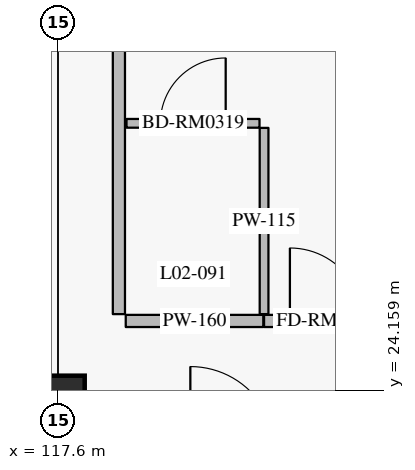
"""IFC4 building model, lengths in metres.
Left out: names, types, materials, properties, quantities, classifications, styles, units other than length and angle.
Written with IfcOpenShell. Run it as: python <this file> out.ifc"""

import sys

from ifc_helpers import new_model, si_unit, direction, frame, frame_2d, origin, origin_2d, place, context, subcontext, project, spatial, rectangle, extrude, element, fill, save


model = new_model("IFC4")
c1 = context("Model", 3, precision=1e-05, world=origin(), true_north=direction((0.0, 1.0)))
c2 = subcontext(c1, "Body", "Model", "MODEL_VIEW")
j1 = project(units=[si_unit("LENGTHUNIT", "METRE"), si_unit("PLANEANGLEUNIT", "RADIAN")], contexts=[c1])
p1 = place(None, origin())
s1 = spatial("IfcSite", under=j1, at=p1, CompositionType="ELEMENT")
p2 = place(p1, origin())
s2 = spatial("IfcBuilding", under=s1, at=p2, CompositionType="ELEMENT")
p3 = place(p2, frame((0.0, 0.0, 11.4)))
s3 = spatial("IfcBuildingStorey", under=s2, at=p3, CompositionType="ELEMENT", Elevation=11.4)
p4 = place(p3, frame((117.6, 24.0, 0.0), z_axis=(0.0, 0.0, 1.0), x_axis=(1.0, 0.0, 0.0)))
e1 = element("IfcColumn", 1, at=p4, inside=s3, PredefinedType="COLUMN", context=c2, shape_type="SweptSolid", body=[
    extrude(rectangle(XDim=0.7, YDim=0.7, at=origin_2d()), origin(), (0.0, 0.0, 1.0), 4.8),
])
p5 = place(p3, frame((118.49, 25.07, 0.0), z_axis=(0.0, 0.0, 1.0), x_axis=(1.0, 0.0, 0.0)))
e2 = element("IfcWall", 2, at=p5, inside=s3, PredefinedType="PARTITIONING", context=c2, shape_type="SweptSolid", body=[
    extrude(rectangle(XDim=1.81, YDim=0.16, at=frame_2d((0.905, 0.0))), origin(), (0.0, 0.0, 1.0), 4.535),
])
p6 = place(p3, frame((120.31, 25.07, 0.0), z_axis=(0.0, 0.0, 1.0), x_axis=(1.0, 0.0, 0.0)))
e3 = element("IfcWall", 3, at=p6, inside=s3, PredefinedType="PARTITIONING", context=c2, shape_type="SweptSolid", body=[
    extrude(rectangle(XDim=1.64, YDim=0.16, at=frame_2d((0.82, 0.0))), origin(), (0.0, 0.0, 1.0), 4.535),
])
p7 = place(p6, frame((0.34, 0.0, 0.0)))
e4 = element("IfcOpeningElement", 4, at=p7, cuts=e3, PredefinedType="OPENING", context=c2, shape_type="SweptSolid", body=[
    extrude(rectangle(XDim=0.96, YDim=2.2, at=frame_2d((0.48, 1.1))), frame((0.0, 0.09, 0.0), z_axis=(0.0, -1.0, 0.0), x_axis=(1.0, 0.0, 0.0)), (0.0, 0.0, 1.0), 0.18),
])
p8 = place(p3, frame((120.31, 25.16, 0.0), z_axis=(0.0, 0.0, 1.0), x_axis=(0.0, 1.0, 0.0)))
e5 = element("IfcWall", 5, at=p8, inside=s3, PredefinedType="PARTITIONING", context=c2, shape_type="SweptSolid", body=[
    extrude(rectangle(XDim=2.45, YDim=0.115, at=frame_2d((1.225, 0.0))), origin(), (0.0, 0.0, 1.0), 4.535),
])
p9 = place(p3, frame((118.5, 27.67, 0.0), z_axis=(0.0, 0.0, 1.0), x_axis=(1.0, 0.0, 0.0)))
e6 = element("IfcWall", 6, at=p9, inside=s3, PredefinedType="PARTITIONING", context=c2, shape_type="SweptSolid", body=[
    extrude(rectangle(XDim=1.75, YDim=0.115, at=frame_2d((0.875, 0.0))), origin(), (0.0, 0.0, 1.0), 4.535),
])
p10 = place(p9, frame((0.445, 0.0, 0.0)))
e7 = element("IfcOpeningElement", 7, at=p10, cuts=e6, PredefinedType="OPENING", context=c2, shape_type="SweptSolid", body=[
    extrude(rectangle(XDim=0.86, YDim=2.12, at=frame_2d((0.43, 1.06))), frame((0.0, 0.067, 0.0), z_axis=(0.0, -1.0, 0.0), x_axis=(1.0, 0.0, 0.0)), (0.0, 0.0, 1.0), 0.135),
])
p11 = place(p3, frame((118.4, 25.16, 0.0), z_axis=(0.0, 0.0, 1.0), x_axis=(0.0, 1.0, 0.0)))
e8 = element("IfcWall", 8, at=p11, inside=s3, PredefinedType="PARTITIONING", context=c2, shape_type="SweptSolid", body=[
    extrude(rectangle(XDim=6.5, YDim=0.16, at=frame_2d((3.25, 0.0))), origin(), (0.0, 0.0, 1.0), 4.535),
])
p12 = place(p7, origin())
e9 = element("IfcDoor", 9, at=p12, inside=s3, OperationType="SINGLE_SWING_LEFT", PredefinedType="DOOR", context=c2, shape_type="SweptSolid", body=[
    extrude(rectangle(XDim=0.96, YDim=2.2, at=frame_2d((0.48, 1.1))), frame((0.0, 0.025, 0.0), z_axis=(0.0, -1.0, 0.0), x_axis=(1.0, 0.0, 0.0)), (0.0, 0.0, 1.0), 0.05),
])
fill(e4, e9)
p13 = place(p10, origin())
e10 = element("IfcDoor", 10, at=p13, inside=s3, OperationType="SINGLE_SWING_RIGHT", PredefinedType="DOOR", context=c2, shape_type="SweptSolid", body=[
    extrude(rectangle(XDim=0.86, YDim=2.12, at=frame_2d((0.43, 1.06))), frame((0.0, 0.025, 0.0), z_axis=(0.0, -1.0, 0.0), x_axis=(1.0, 0.0, 0.0)), (0.0, 0.0, 1.0), 0.05),
])
fill(e7, e10)
save(model, sys.argv[1])
